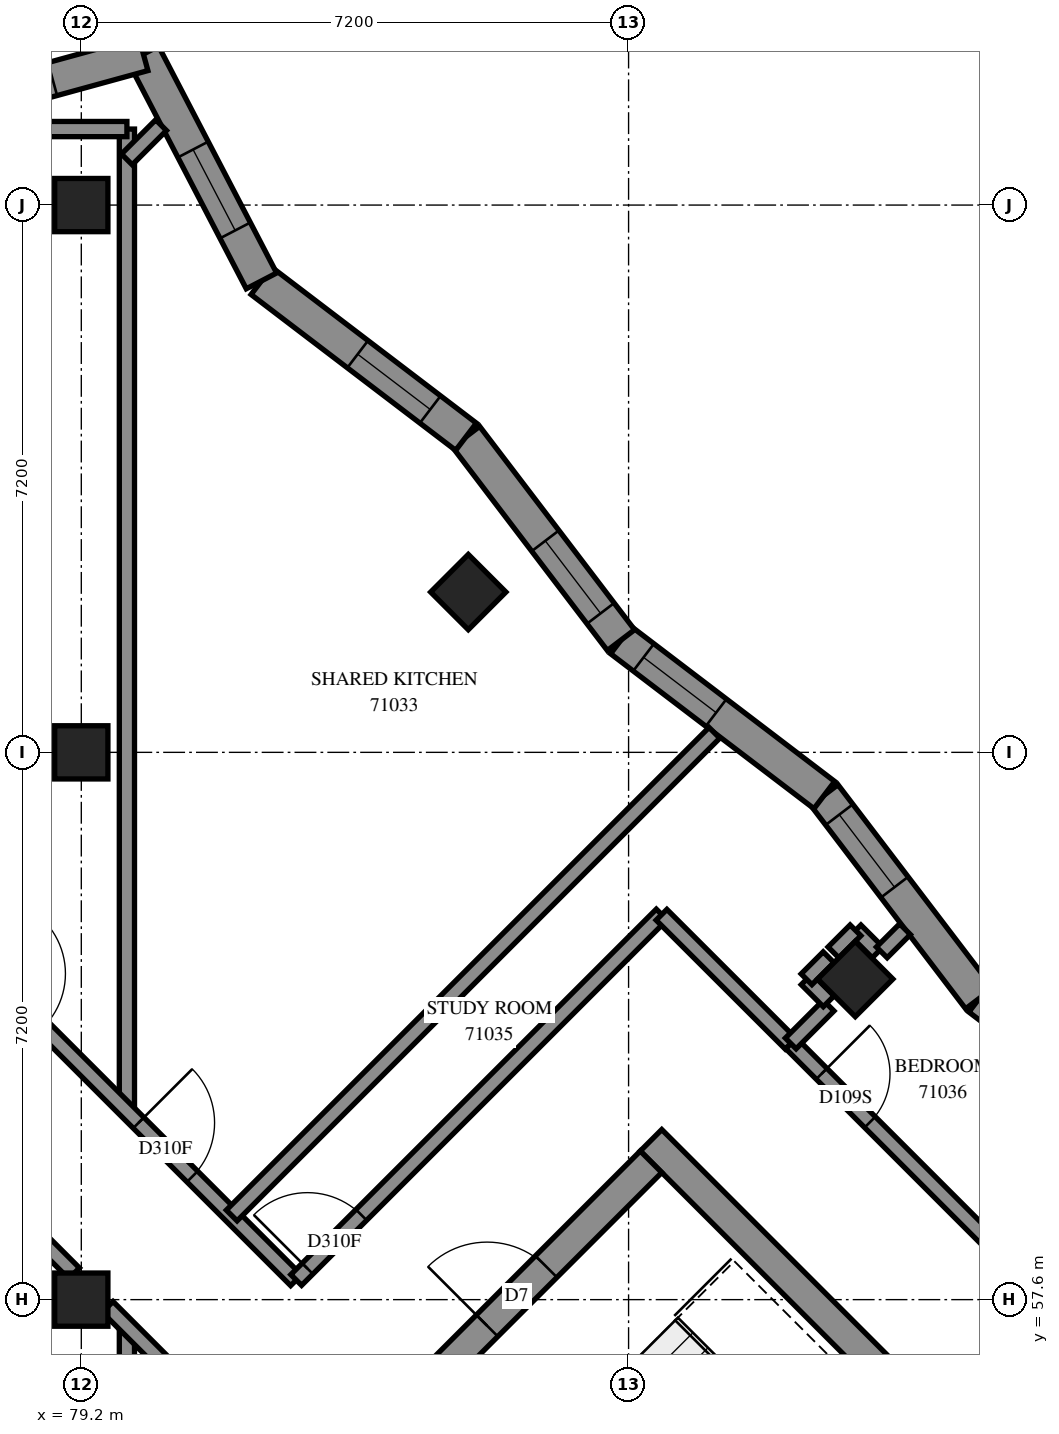
"""IFC4 building model, lengths in metres.
Left out: names, types, materials, properties, quantities, classifications, styles, units other than length and angle.
Written with IfcOpenShell. Run it as: python <this file> out.ifc"""

import sys

from ifc_helpers import new_model, si_unit, direction, frame, frame_2d, origin, origin_2d, place, context, subcontext, project, spatial, polyline, rectangle, outline, extrude, element, fill, save


model = new_model("IFC4")
c1 = context("Model", 3, precision=1e-05, world=origin(), true_north=direction((0.0, 1.0)))
c2 = subcontext(c1, "Body", "Model", "MODEL_VIEW")
j1 = project(units=[si_unit("LENGTHUNIT", "METRE"), si_unit("PLANEANGLEUNIT", "RADIAN")], contexts=[c1])
p1 = place(None, origin())
s1 = spatial("IfcSite", under=j1, at=p1, CompositionType="ELEMENT")
p2 = place(p1, origin())
s2 = spatial("IfcBuilding", under=s1, at=p2, CompositionType="ELEMENT")
p3 = place(p2, frame((0.0, 0.0, 260.8)))
s3 = spatial("IfcBuildingStorey", under=s2, at=p3, CompositionType="ELEMENT", Elevation=260.8)
for number, where, z_axis, x_axis in (
    (1, (79.2, 57.6, 0.0), (0.0, 0.0, 1.0), (1.0, 0.0, 0.0)),
    (2, (79.2, 64.8, 0.0), (0.0, 0.0, 1.0), (1.0, 0.0, 0.0)),
    (3, (79.2, 72.0, 0.0), (0.0, 0.0, 1.0), (1.0, 0.0, 0.0)),
    (4, (84.291, 66.909, 0.0), (0.0, 0.0, 1.0), (0.707, -0.707, 0.0)),
    (5, (89.382, 61.818, 0.0), (0.0, 0.0, 1.0), (0.707, -0.707, 0.0)),
):
    element("IfcColumn", number, at=place(p3, frame(where, z_axis=z_axis, x_axis=x_axis)), inside=s3, PredefinedType="COLUMN", context=c2, shape_type="SweptSolid", body=[
        extrude(rectangle(XDim=0.7, YDim=0.7, at=origin_2d()), origin(), (0.0, 0.0, 1.0), 3.1),
    ])
p4 = place(p3, frame((86.695, 59.696, -0.3), z_axis=(0.0, 0.0, 1.0), x_axis=(0.7071100706, -0.7071034917, 0.0)))
e6 = element("IfcWall", 6, at=p4, inside=s3, PredefinedType="SHEAR", context=c2, shape_type="SweptSolid", body=[
    extrude(rectangle(XDim=15.2, YDim=0.4, at=frame_2d((7.6, 0.0))), origin(), (0.0, 0.0, 1.0), 2.7),
])
p5 = place(p4, frame((10.4, 0.0, 0.3)))
e7 = element("IfcOpeningElement", 7, at=p5, cuts=e6, PredefinedType="OPENING", context=c2, shape_type="SweptSolid", body=[
    extrude(rectangle(XDim=0.8, YDim=2.1, at=frame_2d((0.4, 1.05))), frame((0.0, 0.21, 0.0), z_axis=(0.0, -1.0, 0.0), x_axis=(1.0, 0.0, 0.0)), (0.0, 0.0, 1.0), 0.42),
])
p6 = place(p3, frame((76.513, 49.231, -0.3), z_axis=(0.0, 0.0, 1.0), x_axis=(0.7071067812, 0.7071067812, 0.0)))
e8 = element("IfcWall", 8, at=p6, inside=s3, PredefinedType="SHEAR", context=c2, shape_type="SweptSolid", body=[
    extrude(rectangle(XDim=14.4, YDim=0.4, at=frame_2d((7.2, 0.0))), origin(), (0.0, 0.0, 1.0), 2.7),
])
p7 = place(p6, frame((4.55, 0.0, 0.3)))
e9 = element("IfcOpeningElement", 9, at=p7, cuts=e8, PredefinedType="OPENING", context=c2, shape_type="SweptSolid", body=[
    extrude(rectangle(XDim=1.1, YDim=2.1, at=frame_2d((0.55, 1.05))), frame((0.0, 0.21, 0.0), z_axis=(0.0, -1.0, 0.0), x_axis=(1.0, 0.0, 0.0)), (0.0, 0.0, 1.0), 0.42),
])
p8 = place(p6, frame((11.35, 0.0, 0.3)))
e10 = element("IfcOpeningElement", 10, at=p8, cuts=e8, PredefinedType="OPENING", context=c2, shape_type="SweptSolid", body=[
    extrude(rectangle(XDim=1.1, YDim=2.1, at=frame_2d((0.55, 1.05))), frame((0.0, 0.21, 0.0), z_axis=(0.0, -1.0, 0.0), x_axis=(1.0, 0.0, 0.0)), (0.0, 0.0, 1.0), 0.42),
])
p9 = place(p3, frame((93.689, 59.525, 0.0), z_axis=(0.0, 0.0, 1.0), x_axis=(-0.7955327164, 0.6059106346, 0.0)))
e11 = element("IfcWall", 11, at=p9, inside=s3, PredefinedType="SOLIDWALL", context=c2, shape_type="SweptSolid", body=[
    extrude(outline(polyline([(-0.03, -0.225), (3.333, -0.225), (3.394, 0.225), (0.03, 0.225), (-0.03, -0.225)])), origin(), (0.0, 0.0, 1.0), 3.1),
])
p10 = place(p9, frame((1.52, 0.0, 0.45)))
e12 = element("IfcOpeningElement", 12, at=p10, cuts=e11, PredefinedType="OPENING", context=c2, shape_type="SweptSolid", body=[
    extrude(rectangle(XDim=1.2, YDim=2.55, at=frame_2d((0.6, 1.275))), frame((0.0, 0.235, 0.0), z_axis=(0.0, -1.0, 0.0), x_axis=(1.0, 0.0, 0.0)), (0.0, 0.0, 1.0), 0.47),
])
p11 = place(p3, frame((91.013, 61.562, 0.0), z_axis=(0.0, 0.0, 1.0), x_axis=(-0.6059151193, 0.7955293007, 0.0)))
e13 = element("IfcWall", 13, at=p11, inside=s3, PredefinedType="SOLIDWALL", context=c2, shape_type="SweptSolid", body=[
    extrude(outline(polyline([(0.03, -0.225), (3.394, -0.225), (3.333, 0.225), (-0.03, 0.225), (0.03, -0.225)])), origin(), (0.0, 0.0, 1.0), 3.1),
])
p12 = place(p11, frame((1.84, 0.0, 0.45)))
e14 = element("IfcOpeningElement", 14, at=p12, cuts=e13, PredefinedType="OPENING", context=c2, shape_type="SweptSolid", body=[
    extrude(rectangle(XDim=1.2, YDim=2.55, at=frame_2d((0.6, 1.275))), frame((0.0, 0.235, 0.0), z_axis=(0.0, -1.0, 0.0), x_axis=(1.0, 0.0, 0.0)), (0.0, 0.0, 1.0), 0.47),
])
p13 = place(p3, frame((88.975, 64.238, 0.0), z_axis=(0.0, 0.0, 1.0), x_axis=(-0.7955327164, 0.6059106346, 0.0)))
e15 = element("IfcWall", 15, at=p13, inside=s3, PredefinedType="SOLIDWALL", context=c2, shape_type="SweptSolid", body=[
    extrude(outline(polyline([(-0.03, -0.225), (3.333, -0.225), (3.394, 0.225), (0.03, 0.225), (-0.03, -0.225)])), origin(), (0.0, 0.0, 1.0), 3.1),
])
p14 = place(p13, frame((1.789, 0.0, 0.45)))
e16 = element("IfcOpeningElement", 16, at=p14, cuts=e15, PredefinedType="OPENING", context=c2, shape_type="SweptSolid", body=[
    extrude(rectangle(XDim=1.2, YDim=2.55, at=frame_2d((0.6, 1.275))), frame((0.0, 0.235, 0.0), z_axis=(0.0, -1.0, 0.0), x_axis=(1.0, 0.0, 0.0)), (0.0, 0.0, 1.0), 0.47),
])
p15 = place(p3, frame((86.3, 66.276, 0.0), z_axis=(0.0, 0.0, 1.0), x_axis=(-0.6059151193, 0.7955293007, 0.0)))
e17 = element("IfcWall", 17, at=p15, inside=s3, PredefinedType="SOLIDWALL", context=c2, shape_type="SweptSolid", body=[
    extrude(outline(polyline([(0.03, -0.225), (3.394, -0.225), (3.333, 0.225), (-0.03, 0.225), (0.03, -0.225)])), origin(), (0.0, 0.0, 1.0), 3.1),
])
p16 = place(p15, frame((0.442, 0.0, 0.45)))
e18 = element("IfcOpeningElement", 18, at=p16, cuts=e17, PredefinedType="OPENING", context=c2, shape_type="SweptSolid", body=[
    extrude(rectangle(XDim=1.2, YDim=2.55, at=frame_2d((0.6, 1.275))), frame((0.0, 0.235, 0.0), z_axis=(0.0, -1.0, 0.0), x_axis=(1.0, 0.0, 0.0)), (0.0, 0.0, 1.0), 0.47),
])
p17 = place(p3, frame((84.261, 68.952, 0.0), z_axis=(0.0, 0.0, 1.0), x_axis=(-0.7955233042, 0.6059229922, 0.0)))
e19 = element("IfcWall", 19, at=p17, inside=s3, PredefinedType="SOLIDWALL", context=c2, shape_type="SweptSolid", body=[
    extrude(outline(polyline([(-0.03, -0.225), (3.333, -0.225), (3.434, 0.225), (0.03, 0.225), (-0.03, -0.225)])), origin(), (0.0, 0.0, 1.0), 3.1),
])
p18 = place(p17, frame((0.592, 0.0, 0.45)))
e20 = element("IfcOpeningElement", 20, at=p18, cuts=e19, PredefinedType="OPENING", context=c2, shape_type="SweptSolid", body=[
    extrude(rectangle(XDim=1.2, YDim=2.55, at=frame_2d((0.6, 1.275))), frame((0.0, 0.235, 0.0), z_axis=(0.0, -1.0, 0.0), x_axis=(1.0, 0.0, 0.0)), (0.0, 0.0, 1.0), 0.47),
])
p19 = place(p3, frame((81.57, 71.002, 0.0), z_axis=(0.0, 0.0, 1.0), x_axis=(-0.4617458541, 0.8870122695, 0.0)))
e21 = element("IfcWall", 21, at=p19, inside=s3, PredefinedType="SOLIDWALL", context=c2, shape_type="SweptSolid", body=[
    extrude(outline(polyline([(0.05, -0.225), (3.545, -0.225), (3.182, 0.225), (-0.05, 0.225), (0.05, -0.225)])), origin(), (0.0, 0.0, 1.0), 3.1),
])
p20 = place(p19, frame((0.748, 0.0, 0.45)))
e22 = element("IfcOpeningElement", 22, at=p20, cuts=e21, PredefinedType="OPENING", context=c2, shape_type="SweptSolid", body=[
    extrude(rectangle(XDim=1.2, YDim=2.55, at=frame_2d((0.6, 1.275))), frame((0.0, 0.235, 0.0), z_axis=(0.0, -1.0, 0.0), x_axis=(1.0, 0.0, 0.0)), (0.0, 0.0, 1.0), 0.47),
])
p21 = place(p3, frame((80.017, 73.986, 0.0), z_axis=(0.0, 0.0, 1.0), x_axis=(-0.9643045882, -0.2647955081, 0.0)))
e23 = element("IfcWall", 23, at=p21, inside=s3, PredefinedType="SOLIDWALL", context=c2, shape_type="SweptSolid", body=[
    extrude(outline(polyline([(-0.182, -0.225), (3.787, -0.225), (3.875, 0.225), (0.182, 0.225), (-0.182, -0.225)])), origin(), (0.0, 0.0, 1.0), 3.1),
])
p22 = place(p21, frame((1.239, 0.0, 0.45)))
e24 = element("IfcOpeningElement", 24, at=p22, cuts=e23, PredefinedType="OPENING", context=c2, shape_type="SweptSolid", body=[
    extrude(rectangle(XDim=1.2, YDim=2.55, at=frame_2d((0.6, 1.275))), frame((0.0, 0.235, 0.0), z_axis=(0.0, -1.0, 0.0), x_axis=(1.0, 0.0, 0.0)), (0.0, 0.0, 1.0), 0.47),
])
p23 = place(p3, frame((79.8, 60.086, 0.0), z_axis=(0.0, 0.0, 1.0), x_axis=(0.0, 1.0, 0.0)))
e25 = element("IfcWall", 25, at=p23, inside=s3, PredefinedType="PARTITIONING", context=c2, shape_type="SweptSolid", body=[
    extrude(rectangle(XDim=12.914, YDim=0.2, at=frame_2d((6.457, 0.0))), origin(), (0.0, 0.0, 1.0), 3.1),
])
p24 = place(p3, frame((74.397, 65.483, 0.0), z_axis=(0.0, 0.0, 1.0), x_axis=(0.7071067812, -0.7071067812, 0.0)))
e26 = element("IfcWall", 26, at=p24, inside=s3, PredefinedType="PARTITIONING", context=c2, shape_type="SweptSolid", body=[
    extrude(rectangle(XDim=10.788, YDim=0.2, at=frame_2d((5.394, 0.0))), origin(), (0.0, 0.0, 1.0), 3.1),
])
p25 = place(p24, frame((5.083, 0.0, 0.0)))
e27 = element("IfcOpeningElement", 27, at=p25, cuts=e26, PredefinedType="OPENING", context=c2, shape_type="SweptSolid", body=[
    extrude(rectangle(XDim=1.0, YDim=2.1, at=frame_2d((0.5, 1.05))), frame((0.0, 0.11, 0.0), z_axis=(0.0, -1.0, 0.0), x_axis=(1.0, 0.0, 0.0)), (0.0, 0.0, 1.0), 0.22),
])
p26 = place(p24, frame((7.858, 0.0, 0.0)))
e28 = element("IfcOpeningElement", 28, at=p26, cuts=e26, PredefinedType="OPENING", context=c2, shape_type="SweptSolid", body=[
    extrude(rectangle(XDim=1.0, YDim=2.1, at=frame_2d((0.5, 1.05))), frame((0.0, 0.11, 0.0), z_axis=(0.0, -1.0, 0.0), x_axis=(1.0, 0.0, 0.0)), (0.0, 0.0, 1.0), 0.22),
])
p27 = place(p3, frame((81.179, 58.707, 0.0), z_axis=(0.0, 0.0, 1.0), x_axis=(0.7071067812, 0.7071067812, 0.0)))
e29 = element("IfcWall", 29, at=p27, inside=s3, PredefinedType="PARTITIONING", context=c2, shape_type="SweptSolid", body=[
    extrude(rectangle(XDim=8.98, YDim=0.2, at=frame_2d((4.49, 0.0))), origin(), (0.0, 0.0, 1.0), 3.1),
])
p28 = place(p3, frame((82.028, 57.858, 0.0), z_axis=(0.0, 0.0, 1.0), x_axis=(0.7071067812, 0.7071067812, 0.0)))
e30 = element("IfcWall", 30, at=p28, inside=s3, PredefinedType="PARTITIONING", context=c2, shape_type="SweptSolid", body=[
    extrude(rectangle(XDim=6.8, YDim=0.2, at=frame_2d((3.4, 0.0))), origin(), (0.0, 0.0, 1.0), 3.1),
])
p29 = place(p28, frame((0.211, 0.0, 0.0)))
e31 = element("IfcOpeningElement", 31, at=p29, cuts=e30, PredefinedType="OPENING", context=c2, shape_type="SweptSolid", body=[
    extrude(rectangle(XDim=1.0, YDim=2.1, at=frame_2d((0.5, 1.05))), frame((0.0, 0.11, 0.0), z_axis=(0.0, -1.0, 0.0), x_axis=(1.0, 0.0, 0.0)), (0.0, 0.0, 1.0), 0.22),
])
p30 = place(p3, frame((88.537, 60.973, 0.0), z_axis=(0.0, 0.0, 1.0), x_axis=(0.7071067812, -0.7071067812, 0.0)))
e32 = element("IfcWall", 32, at=p30, inside=s3, PredefinedType="PARTITIONING", context=c2, shape_type="SweptSolid", body=[
    extrude(rectangle(XDim=6.401, YDim=0.2, at=frame_2d((3.2, 0.0))), origin(), (0.0, 0.0, 1.0), 3.1),
])
p31 = place(p30, frame((0.569, 0.0, 0.0)))
e33 = element("IfcOpeningElement", 33, at=p31, cuts=e32, PredefinedType="OPENING", context=c2, shape_type="SweptSolid", body=[
    extrude(rectangle(XDim=0.9, YDim=2.1, at=frame_2d((0.45, 1.05))), frame((0.0, 0.11, 0.0), z_axis=(0.0, -1.0, 0.0), x_axis=(1.0, 0.0, 0.0)), (0.0, 0.0, 1.0), 0.22),
])
p32 = place(p3, frame((77.326, 73.0, 0.0), z_axis=(0.0, 0.0, 1.0), x_axis=(1.0, 0.0, 0.0)))
e34 = element("IfcWall", 34, at=p32, inside=s3, PredefinedType="PARTITIONING", context=c2, shape_type="SweptSolid", body=[
    extrude(rectangle(XDim=2.474, YDim=0.2, at=frame_2d((1.237, 0.0))), origin(), (0.0, 0.0, 1.0), 3.1),
])
p33 = place(p3, frame((86.833, 62.663, 0.0), z_axis=(0.0, 0.0, 1.0), x_axis=(0.7075233388, -0.706689978, 0.0)))
e35 = element("IfcWall", 35, at=p33, inside=s3, PredefinedType="PARTITIONING", context=c2, shape_type="SweptSolid", body=[
    extrude(rectangle(XDim=2.4, YDim=0.2, at=frame_2d((1.2, 0.0))), origin(), (0.0, 0.0, 1.0), 3.1),
])
p34 = place(p3, frame((79.8, 55.63, 0.0), z_axis=(0.0, 0.0, 1.0), x_axis=(0.0, 1.0, 0.0)))
e36 = element("IfcWall", 36, at=p34, inside=s3, PredefinedType="PARTITIONING", context=c2, shape_type="SweptSolid", body=[
    extrude(rectangle(XDim=1.628, YDim=0.2, at=frame_2d((0.814, 0.0))), origin(), (0.0, 0.0, 1.0), 3.1),
])
p35 = place(p3, frame((79.547, 57.505, 0.0), z_axis=(0.0, 0.0, 1.0), x_axis=(0.7071067812, -0.7071067812, 0.0)))
e37 = element("IfcWall", 37, at=p35, inside=s3, PredefinedType="PARTITIONING", context=c2, shape_type="SweptSolid", body=[
    extrude(rectangle(XDim=1.505, YDim=0.2, at=frame_2d((0.752, 0.0))), origin(), (0.0, 0.0, 1.0), 3.1),
])
p36 = place(p3, frame((88.534, 60.971, 0.0), z_axis=(0.0, 0.0, 1.0), x_axis=(0.7071067812, 0.7071067812, 0.0)))
e38 = element("IfcWall", 38, at=p36, inside=s3, PredefinedType="PARTITIONING", context=c2, shape_type="SweptSolid", body=[
    extrude(rectangle(XDim=0.704, YDim=0.2, at=frame_2d((0.352, 0.0))), origin(), (0.0, 0.0, 1.0), 3.1),
])
p37 = place(p3, frame((78.655, 58.397, 0.0), z_axis=(0.0, 0.0, 1.0), x_axis=(0.7071067812, -0.7071067812, 0.0)))
e39 = element("IfcWall", 39, at=p37, inside=s3, PredefinedType="PARTITIONING", context=c2, shape_type="SweptSolid", body=[
    extrude(rectangle(XDim=0.636, YDim=0.2, at=frame_2d((0.318, 0.0))), origin(), (0.0, 0.0, 1.0), 3.1),
])
p38 = place(p3, frame((79.799, 72.601, 0.0), z_axis=(0.0, 0.0, 1.0), x_axis=(0.7070282879, 0.7071852658, 0.0)))
e40 = element("IfcWall", 40, at=p38, inside=s3, PredefinedType="PARTITIONING", context=c2, shape_type="SweptSolid", body=[
    extrude(rectangle(XDim=0.637, YDim=0.2, at=frame_2d((0.319, 0.0))), origin(), (0.0, 0.0, 1.0), 3.1),
])
for number, where, z_axis, x_axis in (
    (41, (88.743, 61.815, 0.0), (0.0, 0.0, 1.0), (0.707, -0.707, 0.0)),
    (42, (89.386, 62.458, 0.0), (0.0, 0.0, 1.0), (0.707, -0.707, 0.0)),
    (43, (88.741, 61.815, 0.0), (0.0, 0.0, 1.0), (0.707, 0.707, 0.0)),
    (44, (89.095, 62.169, 0.0), (0.0, 0.0, 1.0), (0.707, 0.707, 0.0)),
):
    element("IfcWall", number, at=place(p3, frame(where, z_axis=z_axis, x_axis=x_axis)), inside=s3, PredefinedType="PARTITIONING", context=c2, shape_type="SweptSolid", body=[
        extrude(rectangle(XDim=0.41, YDim=0.2, at=frame_2d((0.205, 0.0))), origin(), (0.0, 0.0, 1.0), 3.1),
    ])
p39 = place(p3, frame((89.731, 62.169, 0.0), z_axis=(0.0, 0.0, 1.0), x_axis=(0.7071067812, 0.7071067812, 0.0)))
e45 = element("IfcWall", 45, at=p39, inside=s3, PredefinedType="PARTITIONING", context=c2, shape_type="SweptSolid", body=[
    extrude(rectangle(XDim=0.432, YDim=0.2, at=frame_2d((0.216, 0.0))), origin(), (0.0, 0.0, 1.0), 3.1),
])
p40 = place(p12, origin())
e46 = element("IfcWindow", 46, at=p40, inside=s3, PartitioningType="SINGLE_PANEL", PredefinedType="WINDOW", context=c2, shape_type="SweptSolid", body=[
    extrude(rectangle(XDim=1.2, YDim=2.55, at=frame_2d((0.6, 1.275))), frame((0.0, 0.205, 0.0), z_axis=(0.0, -1.0, 0.0), x_axis=(1.0, 0.0, 0.0)), (0.0, 0.0, 1.0), 0.06),
])
fill(e14, e46)
p41 = place(p14, origin())
e47 = element("IfcWindow", 47, at=p41, inside=s3, PartitioningType="SINGLE_PANEL", PredefinedType="WINDOW", context=c2, shape_type="SweptSolid", body=[
    extrude(rectangle(XDim=1.2, YDim=2.55, at=frame_2d((0.6, 1.275))), frame((0.0, 0.205, 0.0), z_axis=(0.0, -1.0, 0.0), x_axis=(1.0, 0.0, 0.0)), (0.0, 0.0, 1.0), 0.06),
])
fill(e16, e47)
p42 = place(p16, origin())
e48 = element("IfcWindow", 48, at=p42, inside=s3, PartitioningType="SINGLE_PANEL", PredefinedType="WINDOW", context=c2, shape_type="SweptSolid", body=[
    extrude(rectangle(XDim=1.2, YDim=2.55, at=frame_2d((0.6, 1.275))), frame((0.0, 0.205, 0.0), z_axis=(0.0, -1.0, 0.0), x_axis=(1.0, 0.0, 0.0)), (0.0, 0.0, 1.0), 0.06),
])
fill(e18, e48)
p43 = place(p18, origin())
e49 = element("IfcWindow", 49, at=p43, inside=s3, PartitioningType="SINGLE_PANEL", PredefinedType="WINDOW", context=c2, shape_type="SweptSolid", body=[
    extrude(rectangle(XDim=1.2, YDim=2.55, at=frame_2d((0.6, 1.275))), frame((0.0, 0.205, 0.0), z_axis=(0.0, -1.0, 0.0), x_axis=(1.0, 0.0, 0.0)), (0.0, 0.0, 1.0), 0.06),
])
fill(e20, e49)
p44 = place(p20, origin())
e50 = element("IfcWindow", 50, at=p44, inside=s3, PartitioningType="SINGLE_PANEL", PredefinedType="WINDOW", context=c2, shape_type="SweptSolid", body=[
    extrude(rectangle(XDim=1.2, YDim=2.55, at=frame_2d((0.6, 1.275))), frame((0.0, 0.205, 0.0), z_axis=(0.0, -1.0, 0.0), x_axis=(1.0, 0.0, 0.0)), (0.0, 0.0, 1.0), 0.06),
])
fill(e22, e50)
p45 = place(p22, origin())
e51 = element("IfcWindow", 51, at=p45, inside=s3, PartitioningType="SINGLE_PANEL", PredefinedType="WINDOW", context=c2, shape_type="SweptSolid", body=[
    extrude(rectangle(XDim=1.2, YDim=2.55, at=frame_2d((0.6, 1.275))), frame((0.0, 0.205, 0.0), z_axis=(0.0, -1.0, 0.0), x_axis=(1.0, 0.0, 0.0)), (0.0, 0.0, 1.0), 0.06),
])
fill(e24, e51)
p46 = place(p8, origin())
e52 = element("IfcDoor", 52, at=p46, inside=s3, OperationType="SINGLE_SWING_LEFT", PredefinedType="DOOR", context=c2, shape_type="SweptSolid", body=[
    extrude(rectangle(XDim=1.1, YDim=2.1, at=frame_2d((0.55, 1.05))), frame((0.0, 0.025, 0.0), z_axis=(0.0, -1.0, 0.0), x_axis=(1.0, 0.0, 0.0)), (0.0, 0.0, 1.0), 0.05),
])
fill(e10, e52)
p47 = place(p26, origin())
e53 = element("IfcDoor", 53, at=p47, inside=s3, OperationType="SINGLE_SWING_LEFT", PredefinedType="DOOR", context=c2, shape_type="SweptSolid", body=[
    extrude(rectangle(XDim=1.0, YDim=2.1, at=frame_2d((0.5, 1.05))), frame((0.0, 0.025, 0.0), z_axis=(0.0, -1.0, 0.0), x_axis=(1.0, 0.0, 0.0)), (0.0, 0.0, 1.0), 0.05),
])
fill(e28, e53)
p48 = place(p29, origin())
e54 = element("IfcDoor", 54, at=p48, inside=s3, OperationType="SINGLE_SWING_RIGHT", PredefinedType="DOOR", context=c2, shape_type="SweptSolid", body=[
    extrude(rectangle(XDim=1.0, YDim=2.1, at=frame_2d((0.5, 1.05))), frame((0.0, 0.025, 0.0), z_axis=(0.0, -1.0, 0.0), x_axis=(1.0, 0.0, 0.0)), (0.0, 0.0, 1.0), 0.05),
])
fill(e31, e54)
p49 = place(p31, origin())
e55 = element("IfcDoor", 55, at=p49, inside=s3, OperationType="SINGLE_SWING_LEFT", PredefinedType="DOOR", context=c2, shape_type="SweptSolid", body=[
    extrude(rectangle(XDim=0.9, YDim=2.1, at=frame_2d((0.45, 1.05))), frame((0.0, 0.025, 0.0), z_axis=(0.0, -1.0, 0.0), x_axis=(1.0, 0.0, 0.0)), (0.0, 0.0, 1.0), 0.05),
])
fill(e33, e55)
save(model, sys.argv[1])
